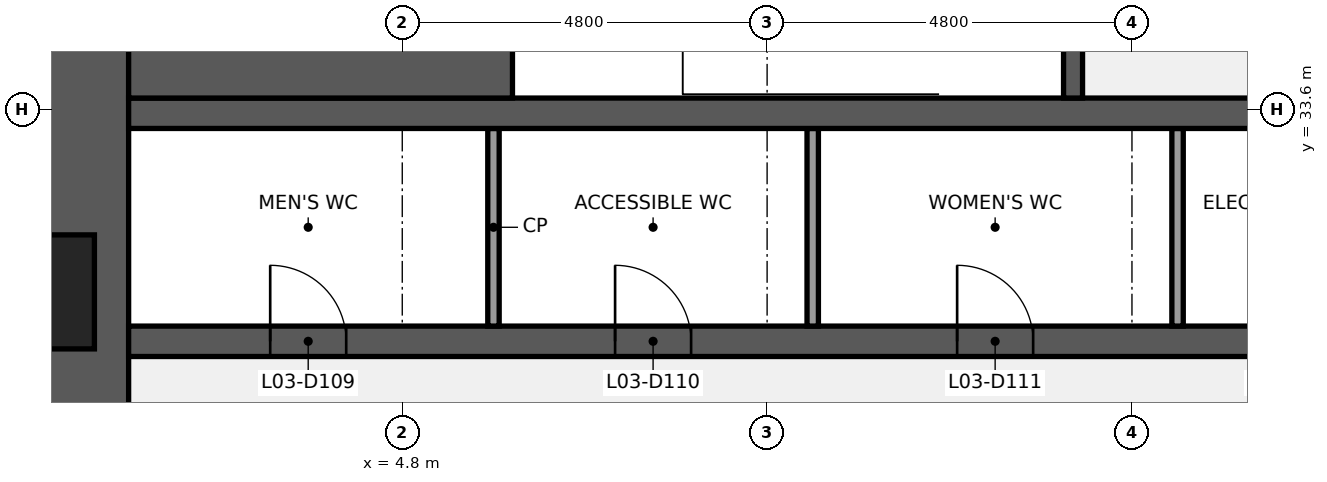
"""IFC4 building model, lengths in metres.
Left out: names, types, materials, properties, quantities, classifications, styles, units other than length and angle.
Written with IfcOpenShell. Run it as: python <this file> out.ifc"""

import sys

from ifc_helpers import new_model, si_unit, direction, frame, frame_2d, origin, place, context, subcontext, project, spatial, rectangle, extrude, element, fill, save


model = new_model("IFC4")
c1 = context("Model", 3, precision=1e-05, world=origin(), true_north=direction((0.0, 1.0)))
c2 = subcontext(c1, "Body", "Model", "MODEL_VIEW")
j1 = project(units=[si_unit("LENGTHUNIT", "METRE"), si_unit("PLANEANGLEUNIT", "RADIAN")], contexts=[c1])
p1 = place(None, origin())
s1 = spatial("IfcSite", under=j1, at=p1, CompositionType="ELEMENT")
p2 = place(p1, origin())
s2 = spatial("IfcBuilding", under=s1, at=p2, CompositionType="ELEMENT")
p3 = place(p2, frame((0.0, 0.0, 21.4)))
s3 = spatial("IfcBuildingStorey", under=s2, at=p3, CompositionType="ELEMENT", Elevation=21.4)
p4 = place(p3, frame((0.6, 9.6, 0.0), z_axis=(0.0, 0.0, 1.0), x_axis=(0.0, 1.0, 0.0)))
e1 = element("IfcWall", 1, at=p4, inside=s3, PredefinedType="SHEAR", context=c2, shape_type="SweptSolid", body=[
    extrude(rectangle(XDim=28.8, YDim=1.2, at=frame_2d((14.4, 0.0))), origin(), (0.0, 0.0, 1.0), 4.24),
])
p5 = place(p4, frame((8.85, 0.0, 0.9)))
e2 = element("IfcOpeningElement", 2, at=p5, cuts=e1, PredefinedType="OPENING", context=c2, shape_type="SweptSolid", body=[
    extrude(rectangle(XDim=1.5, YDim=1.5, at=frame_2d((0.75, 0.75))), frame((0.0, 0.61, 0.0), z_axis=(0.0, -1.0, 0.0), x_axis=(1.0, 0.0, 0.0)), (0.0, 0.0, 1.0), 1.22),
])
p6 = place(p4, frame((18.45, 0.0, 0.9)))
e3 = element("IfcOpeningElement", 3, at=p6, cuts=e1, PredefinedType="OPENING", context=c2, shape_type="SweptSolid", body=[
    extrude(rectangle(XDim=1.5, YDim=1.5, at=frame_2d((0.75, 0.75))), frame((0.0, 0.61, 0.0), z_axis=(0.0, -1.0, 0.0), x_axis=(1.0, 0.0, 0.0)), (0.0, 0.0, 1.0), 1.22),
])
p7 = place(p3, frame((1.2, 30.55, 0.0), z_axis=(0.0, 0.0, 1.0), x_axis=(1.0, 0.0, 0.0)))
e4 = element("IfcWall", 4, at=p7, inside=s3, PredefinedType="SHEAR", context=c2, shape_type="SweptSolid", body=[
    extrude(rectangle(XDim=16.8, YDim=0.4, at=frame_2d((8.4, 0.0))), origin(), (0.0, 0.0, 1.0), 4.24),
])
p8 = place(p7, frame((1.863, 0.0, 0.0)))
e5 = element("IfcOpeningElement", 5, at=p8, cuts=e4, PredefinedType="OPENING", context=c2, shape_type="SweptSolid", body=[
    extrude(rectangle(XDim=1.0, YDim=2.1, at=frame_2d((0.5, 1.05))), frame((0.0, 0.21, 0.0), z_axis=(0.0, -1.0, 0.0), x_axis=(1.0, 0.0, 0.0)), (0.0, 0.0, 1.0), 0.42),
])
p9 = place(p7, frame((6.4, 0.0, 0.0)))
e6 = element("IfcOpeningElement", 6, at=p9, cuts=e4, PredefinedType="OPENING", context=c2, shape_type="SweptSolid", body=[
    extrude(rectangle(XDim=1.0, YDim=2.1, at=frame_2d((0.5, 1.05))), frame((0.0, 0.21, 0.0), z_axis=(0.0, -1.0, 0.0), x_axis=(1.0, 0.0, 0.0)), (0.0, 0.0, 1.0), 0.42),
])
p10 = place(p7, frame((10.9, 0.0, 0.0)))
e7 = element("IfcOpeningElement", 7, at=p10, cuts=e4, PredefinedType="OPENING", context=c2, shape_type="SweptSolid", body=[
    extrude(rectangle(XDim=1.0, YDim=2.1, at=frame_2d((0.5, 1.05))), frame((0.0, 0.21, 0.0), z_axis=(0.0, -1.0, 0.0), x_axis=(1.0, 0.0, 0.0)), (0.0, 0.0, 1.0), 0.42),
])
p11 = place(p7, frame((14.837, 0.0, 0.0)))
e8 = element("IfcOpeningElement", 8, at=p11, cuts=e4, PredefinedType="OPENING", context=c2, shape_type="SweptSolid", body=[
    extrude(rectangle(XDim=1.0, YDim=2.1, at=frame_2d((0.5, 1.05))), frame((0.0, 0.21, 0.0), z_axis=(0.0, -1.0, 0.0), x_axis=(1.0, 0.0, 0.0)), (0.0, 0.0, 1.0), 0.42),
])
for number, where, z_axis, x_axis in (
    (9, (6.0, 30.75, 0.0), (0.0, 0.0, 1.0), (0.0, 1.0, 0.0)),
    (10, (10.2, 30.75, 0.0), (0.0, 0.0, 1.0), (0.0, 1.0, 0.0)),
    (11, (15.0, 30.75, 0.0), (0.0, 0.0, 1.0), (0.0, 1.0, 0.0)),
):
    element("IfcWall", number, at=place(p3, frame(where, z_axis=z_axis, x_axis=x_axis)), inside=s3, PredefinedType="PARTITIONING", context=c2, shape_type="SweptSolid", body=[
        extrude(rectangle(XDim=2.6, YDim=0.15, at=frame_2d((1.3, 0.0))), origin(), (0.0, 0.0, 1.0), 4.24),
    ])
p12 = place(p3, frame((1.2, 33.55, 0.0), z_axis=(0.0, 0.0, 1.0), x_axis=(1.0, 0.0, 0.0)))
e12 = element("IfcWall", 12, at=p12, inside=s3, PredefinedType="SHEAR", context=c2, shape_type="SweptSolid", body=[
    extrude(rectangle(XDim=16.8, YDim=0.4, at=frame_2d((8.4, 0.0))), origin(), (0.0, 0.0, 1.0), 4.24),
])
p13 = place(p3, frame((1.2, 35.475, 0.0), z_axis=(0.0, 0.0, 1.0), x_axis=(1.0, 0.0, 0.0)))
e13 = element("IfcWall", 13, at=p13, inside=s3, PredefinedType="SHEAR", context=c2, shape_type="SweptSolid", body=[
    extrude(rectangle(XDim=5.05, YDim=3.45, at=frame_2d((2.525, 0.0))), origin(), (0.0, 0.0, 1.0), 4.24),
])
p14 = place(p3, frame((13.625, 33.75, 0.0), z_axis=(0.0, 0.0, 1.0), x_axis=(0.0, 1.0, 0.0)))
e14 = element("IfcWall", 14, at=p14, inside=s3, PredefinedType="SHEAR", context=c2, shape_type="SweptSolid", body=[
    extrude(rectangle(XDim=3.45, YDim=0.25, at=frame_2d((1.725, 0.0))), origin(), (0.0, 0.0, 1.0), 4.24),
])
p15 = place(p14, frame((1.175, 0.0, 0.0)))
e15 = element("IfcOpeningElement", 15, at=p15, cuts=e14, PredefinedType="OPENING", context=c2, shape_type="SweptSolid", body=[
    extrude(rectangle(XDim=1.1, YDim=2.1, at=frame_2d((0.55, 1.05))), frame((0.0, 0.135, 0.0), z_axis=(0.0, -1.0, 0.0), x_axis=(1.0, 0.0, 0.0)), (0.0, 0.0, 1.0), 0.27),
])
p16 = place(p8, origin())
e16 = element("IfcDoor", 16, at=p16, inside=s3, OperationType="SINGLE_SWING_LEFT", PredefinedType="DOOR", context=c2, shape_type="SweptSolid", body=[
    extrude(rectangle(XDim=1.0, YDim=2.1, at=frame_2d((0.5, 1.05))), frame((0.0, 0.025, 0.0), z_axis=(0.0, -1.0, 0.0), x_axis=(1.0, 0.0, 0.0)), (0.0, 0.0, 1.0), 0.05),
])
fill(e5, e16)
p17 = place(p9, origin())
e17 = element("IfcDoor", 17, at=p17, inside=s3, OperationType="SINGLE_SWING_LEFT", PredefinedType="DOOR", context=c2, shape_type="SweptSolid", body=[
    extrude(rectangle(XDim=1.0, YDim=2.1, at=frame_2d((0.5, 1.05))), frame((0.0, 0.025, 0.0), z_axis=(0.0, -1.0, 0.0), x_axis=(1.0, 0.0, 0.0)), (0.0, 0.0, 1.0), 0.05),
])
fill(e6, e17)
p18 = place(p10, origin())
e18 = element("IfcDoor", 18, at=p18, inside=s3, OperationType="SINGLE_SWING_LEFT", PredefinedType="DOOR", context=c2, shape_type="SweptSolid", body=[
    extrude(rectangle(XDim=1.0, YDim=2.1, at=frame_2d((0.5, 1.05))), frame((0.0, 0.025, 0.0), z_axis=(0.0, -1.0, 0.0), x_axis=(1.0, 0.0, 0.0)), (0.0, 0.0, 1.0), 0.05),
])
fill(e7, e18)
save(model, sys.argv[1])
